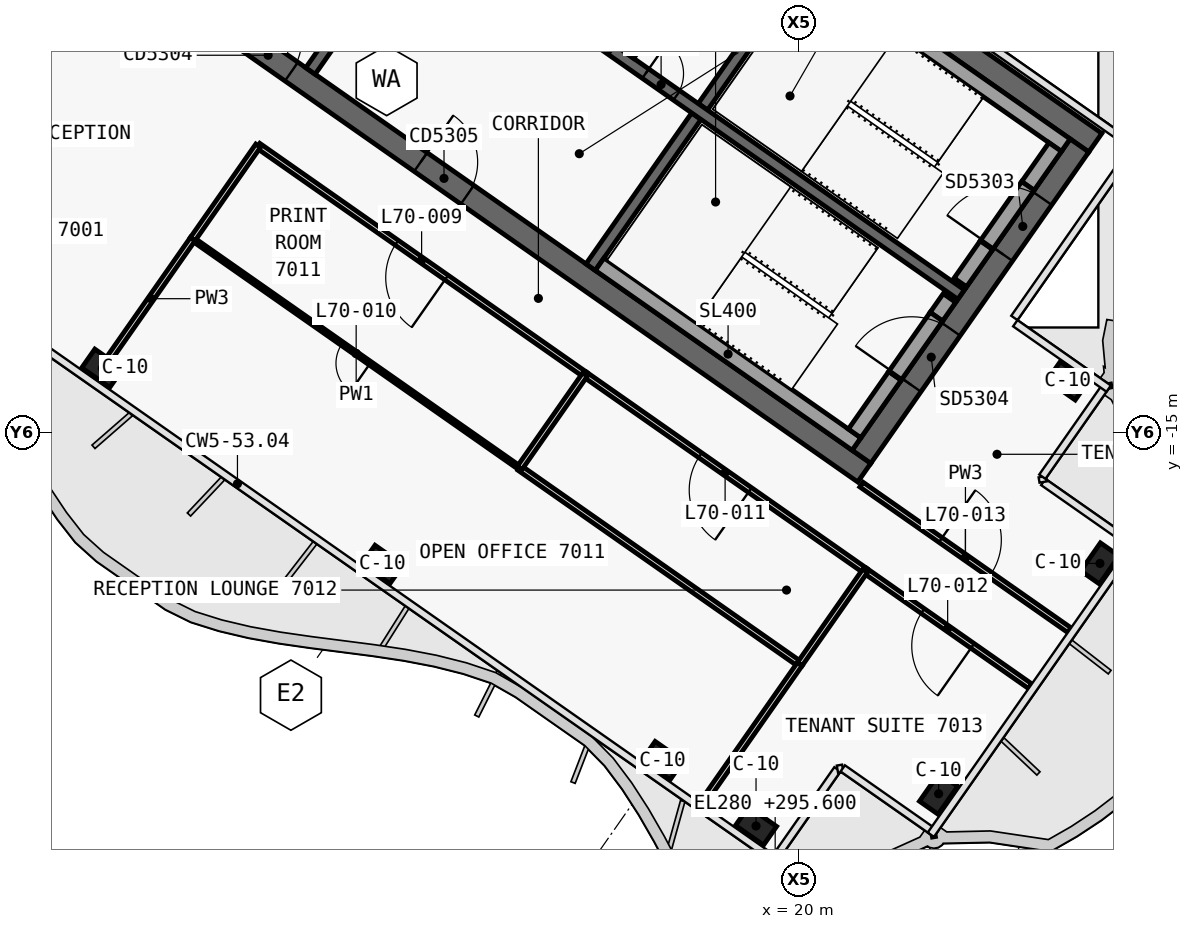
"""IFC4 building model, lengths in metres.
Left out: names, types, materials, properties, quantities, classifications, styles, units other than length and angle.
Written with IfcOpenShell. Run it as: python <this file> out.ifc"""

import sys

from ifc_helpers import new_model, si_unit, direction, frame, frame_2d, origin, origin_2d, place, context, subcontext, project, spatial, polyline, rectangle, outline, extrude, element, fill, save


model = new_model("IFC4")
c1 = context("Model", 3, precision=1e-05, world=origin(), true_north=direction((0.0, 1.0)))
c2 = subcontext(c1, "Body", "Model", "MODEL_VIEW")
j1 = project(units=[si_unit("LENGTHUNIT", "METRE"), si_unit("PLANEANGLEUNIT", "RADIAN")], contexts=[c1])
p1 = place(None, origin())
s1 = spatial("IfcSite", under=j1, at=p1, CompositionType="ELEMENT")
p2 = place(p1, origin())
s2 = spatial("IfcBuilding", under=s1, at=p2, CompositionType="ELEMENT")
p3 = place(p2, frame((0.0, 0.0, 295.6)))
s3 = spatial("IfcBuildingStorey", under=s2, at=p3, CompositionType="ELEMENT", Elevation=295.6)
p4 = place(p3, frame((0.028, 12.066, 0.0), z_axis=(0.0, 0.0, 1.0), x_axis=(0.819151382952, -0.573577380837, 0.0)))
e1 = element("IfcWall", 1, at=p4, inside=s3, PredefinedType="SHEAR", context=c2, shape_type="SweptSolid", body=[
    extrude(outline(polyline([(33.898, 0.3), (0.0, 0.3), (0.42, -0.3), (33.898, -0.3), (33.898, 0.3)])), origin(), (0.0, 0.0, 1.0), 3.9),
])
p5 = place(p3, frame((0.028, -0.874, 0.0), z_axis=(0.0, 0.0, 1.0), x_axis=(0.819150035022, -0.573579305871, 0.0)))
e2 = element("IfcWall", 2, at=p5, inside=s3, PredefinedType="SHEAR", context=c2, shape_type="SweptSolid", body=[
    extrude(outline(polyline([(26.476, 0.3), (0.0, 0.3), (0.42, -0.3), (26.476, -0.3), (26.476, 0.3)])), origin(), (0.0, 0.0, 1.0), 3.9),
])
p6 = place(p5, frame((6.576, 0.0, 0.0)))
e3 = element("IfcOpeningElement", 3, at=p6, cuts=e2, PredefinedType="OPENING", context=c2, shape_type="SweptSolid", body=[
    extrude(rectangle(XDim=1.5, YDim=2.1, at=frame_2d((0.75, 1.05))), frame((0.0, 0.31, 0.0), z_axis=(0.0, -1.0, 0.0), x_axis=(1.0, 0.0, 0.0)), (0.0, 0.0, 1.0), 0.62),
])
p7 = place(p5, frame((12.226, 0.0, 0.0)))
e4 = element("IfcOpeningElement", 4, at=p7, cuts=e2, PredefinedType="OPENING", context=c2, shape_type="SweptSolid", body=[
    extrude(rectangle(XDim=1.5, YDim=2.1, at=frame_2d((0.75, 1.05))), frame((0.0, 0.31, 0.0), z_axis=(0.0, -1.0, 0.0), x_axis=(1.0, 0.0, 0.0)), (0.0, 0.0, 1.0), 0.62),
])
p8 = place(p3, frame((21.642, -15.642, 0.0), z_axis=(0.0, 0.0, 1.0), x_axis=(0.573586866468, 0.819144740944, 0.0)))
e5 = element("IfcWall", 5, at=p8, inside=s3, PredefinedType="SHEAR", context=c2, shape_type="SweptSolid", body=[
    extrude(outline(polyline([(10.0, 0.3), (0.0, 0.3), (0.0, -0.3), (10.0, -0.3), (10.0, 0.3)])), origin(), (0.0, 0.0, 1.0), 3.9),
])
p9 = place(p8, frame((6.5, 0.0, 0.0)))
e6 = element("IfcOpeningElement", 6, at=p9, cuts=e5, PredefinedType="OPENING", context=c2, shape_type="SweptSolid", body=[
    extrude(rectangle(XDim=1.8, YDim=2.1, at=frame_2d((0.9, 1.05))), frame((0.0, 0.31, 0.0), z_axis=(0.0, -1.0, 0.0), x_axis=(1.0, 0.0, 0.0)), (0.0, 0.0, 1.0), 0.62),
])
p10 = place(p8, frame((2.3, 0.0, 0.0)))
e7 = element("IfcOpeningElement", 7, at=p10, cuts=e5, PredefinedType="OPENING", context=c2, shape_type="SweptSolid", body=[
    extrude(rectangle(XDim=1.8, YDim=2.1, at=frame_2d((0.9, 1.05))), frame((0.0, 0.31, 0.0), z_axis=(0.0, -1.0, 0.0), x_axis=(1.0, 0.0, 0.0)), (0.0, 0.0, 1.0), 0.62),
])
p11 = place(p3, frame((7.143, -5.49, 0.0), z_axis=(0.0, 0.0, 1.0), x_axis=(0.573617744349, 0.819123118565, 0.0)))
e8 = element("IfcWall", 8, at=p11, inside=s3, PredefinedType="SHEAR", context=c2, shape_type="SweptSolid", body=[
    extrude(outline(polyline([(0.0, 0.15), (0.0, -0.15), (4.85, -0.15), (4.85, 0.15), (0.0, 0.15)])), origin(), (0.0, 0.0, 1.0), 3.9),
])
p12 = place(p3, frame((14.515, -10.652, 0.0), z_axis=(0.0, 0.0, 1.0), x_axis=(0.573560315113, 0.819163332265, 0.0)))
e9 = element("IfcWall", 9, at=p12, inside=s3, PredefinedType="SHEAR", context=c2, shape_type="SweptSolid", body=[
    extrude(outline(polyline([(0.0, 0.15), (0.0, -0.15), (4.85, -0.15), (4.85, 0.15), (0.0, 0.15)])), origin(), (0.0, 0.0, 1.0), 3.9),
])
p13 = place(p3, frame((17.469, -6.433, 0.0), z_axis=(0.0, 0.0, 1.0), x_axis=(0.573594092424, 0.81913968109, 0.0)))
e10 = element("IfcWall", 10, at=p13, inside=s3, PredefinedType="SHEAR", context=c2, shape_type="SweptSolid", body=[
    extrude(outline(polyline([(4.85, -0.15), (4.85, 0.15), (0.0, 0.15), (0.0, -0.15), (4.85, -0.15)])), origin(), (0.0, 0.0, 1.0), 3.9),
])
p14 = place(p3, frame((2.638, 3.768, 0.0), z_axis=(0.0, 0.0, 1.0), x_axis=(0.819155014212, -0.573572194837, 0.0)))
e11 = element("IfcWall", 11, at=p14, inside=s3, PredefinedType="SHEAR", context=c2, shape_type="SweptSolid", body=[
    extrude(outline(polyline([(0.0, 0.15), (0.0, -0.15), (26.4, -0.15), (26.4, 0.15), (0.0, 0.15)])), origin(), (0.0, 0.0, 1.0), 3.9),
])
p15 = place(p14, frame((9.637, 0.0, 0.0)))
e12 = element("IfcOpeningElement", 12, at=p15, cuts=e11, PredefinedType="OPENING", context=c2, shape_type="SweptSolid", body=[
    extrude(rectangle(XDim=1.2, YDim=2.1, at=frame_2d((0.6, 1.05))), frame((0.0, 0.16, 0.0), z_axis=(0.0, -1.0, 0.0), x_axis=(1.0, 0.0, 0.0)), (0.0, 0.0, 1.0), 0.32),
])
p16 = place(p14, frame((11.812, 0.0, 0.0)))
e13 = element("IfcOpeningElement", 13, at=p16, cuts=e11, PredefinedType="OPENING", context=c2, shape_type="SweptSolid", body=[
    extrude(rectangle(XDim=1.2, YDim=2.1, at=frame_2d((0.6, 1.05))), frame((0.0, 0.16, 0.0), z_axis=(0.0, -1.0, 0.0), x_axis=(1.0, 0.0, 0.0)), (0.0, 0.0, 1.0), 0.32),
])
p17 = place(p14, frame((13.988, 0.0, 0.0)))
e14 = element("IfcOpeningElement", 14, at=p17, cuts=e11, PredefinedType="OPENING", context=c2, shape_type="SweptSolid", body=[
    extrude(rectangle(XDim=1.2, YDim=2.1, at=frame_2d((0.6, 1.05))), frame((0.0, 0.16, 0.0), z_axis=(0.0, -1.0, 0.0), x_axis=(1.0, 0.0, 0.0)), (0.0, 0.0, 1.0), 0.32),
])
p18 = place(p14, frame((16.262, 0.0, 0.0)))
e15 = element("IfcOpeningElement", 15, at=p18, cuts=e11, PredefinedType="OPENING", context=c2, shape_type="SweptSolid", body=[
    extrude(rectangle(XDim=1.0, YDim=2.1, at=frame_2d((0.5, 1.05))), frame((0.0, 0.16, 0.0), z_axis=(0.0, -1.0, 0.0), x_axis=(1.0, 0.0, 0.0)), (0.0, 0.0, 1.0), 0.32),
])
for number, where, z_axis, x_axis in (
    (16, (1.665, -13.313, 0.0), (0.0, 0.0, 1.0), (0.819, -0.574, 0.0)),
    (17, (9.038, -18.475, 0.0), (0.0, 0.0, 1.0), (0.819, -0.574, 0.0)),
    (18, (16.41, -23.637, 0.0), (0.0, 0.0, 1.0), (0.819, -0.574, 0.0)),
    (19, (18.867, -25.358, 0.0), (0.0, 0.0, 1.0), (0.819, -0.574, 0.0)),
    (20, (27.07, -13.644, 0.0), (0.0, 0.0, 1.0), (0.819, -0.574, 0.0)),
    (21, (23.672, -24.51, 0.0), (0.0, 0.0, 1.0), (0.574, 0.819, 0.0)),
    (22, (27.917, -18.449, 0.0), (0.0, 0.0, 1.0), (0.574, 0.819, 0.0)),
):
    element("IfcColumn", number, at=place(p3, frame(where, z_axis=z_axis, x_axis=x_axis)), inside=s3, PredefinedType="COLUMN", context=c2, shape_type="SweptSolid", body=[
        extrude(rectangle(XDim=0.9, YDim=0.6, at=origin_2d()), origin(), (0.0, 0.0, 1.0), 3.9),
    ])
p19 = place(p3, frame((15.565, -5.1, 0.0), z_axis=(0.0, 0.0, 1.0), x_axis=(0.573560315113, 0.819163332265, 0.0)))
e23 = element("IfcWall", 23, at=p19, inside=s3, PredefinedType="SOLIDWALL", context=c2, shape_type="SweptSolid", body=[
    extrude(rectangle(XDim=4.85, YDim=0.2, at=frame_2d((2.425, 0.0))), origin(), (0.0, 0.0, 1.0), 3.9),
])
p20 = place(p3, frame((20.259, -2.71, 0.0), z_axis=(0.0, 0.0, 1.0), x_axis=(0.81914849389, -0.573581506813, 0.0)))
e24 = element("IfcWall", 24, at=p20, inside=s3, PredefinedType="SOLIDWALL", context=c2, shape_type="SweptSolid", body=[
    extrude(rectangle(XDim=8.25, YDim=0.4, at=frame_2d((4.125, 0.0))), origin(), (0.0, 0.0, 1.0), 3.62),
])
p21 = place(p3, frame((24.244, -11.055, 0.0), z_axis=(0.0, 0.0, 1.0), x_axis=(0.573571582932, 0.819155442668, 0.0)))
e25 = element("IfcWall", 25, at=p21, inside=s3, PredefinedType="SOLIDWALL", context=c2, shape_type="SweptSolid", body=[
    extrude(rectangle(XDim=1.2, YDim=0.4, at=frame_2d((0.6, 0.0))), origin(), (0.0, 0.0, 1.0), 3.62),
])
p22 = place(p3, frame((26.022, -8.515, 0.0), z_axis=(0.0, 0.0, 1.0), x_axis=(0.573619628835, 0.819121798889, 0.0)))
e26 = element("IfcWall", 26, at=p22, inside=s3, PredefinedType="SOLIDWALL", context=c2, shape_type="SweptSolid", body=[
    extrude(rectangle(XDim=1.25, YDim=0.4, at=frame_2d((0.625, 0.0))), origin(), (0.0, 0.0, 1.0), 3.62),
])
p23 = place(p3, frame((24.932, -10.072, 2.15), z_axis=(0.0, 0.0, 1.0), x_axis=(0.573591692345, 0.819141361715, 0.0)))
e27 = element("IfcWall", 27, at=p23, inside=s3, PredefinedType="SOLIDWALL", context=c2, shape_type="SweptSolid", body=[
    extrude(rectangle(XDim=1.9, YDim=0.4, at=frame_2d((0.95, 0.0))), origin(), (0.0, 0.0, 1.0), 1.47),
])
p24 = place(p3, frame((14.753, -10.574, 0.0), z_axis=(0.0, 0.0, 1.0), x_axis=(0.819158229677, -0.573567602601, 0.0)))
e28 = element("IfcWall", 28, at=p24, inside=s3, PredefinedType="SOLIDWALL", context=c2, shape_type="SweptSolid", body=[
    extrude(rectangle(XDim=8.25, YDim=0.4, at=frame_2d((4.125, 0.0))), origin(), (0.0, 0.0, 1.0), 3.62),
])
p25 = place(p3, frame((21.462, -15.028, 0.0), z_axis=(0.0, 0.0, 1.0), x_axis=(0.573559770908, 0.819163713305, 0.0)))
e29 = element("IfcWall", 29, at=p25, inside=s3, PredefinedType="SOLIDWALL", context=c2, shape_type="SweptSolid", body=[
    extrude(rectangle(XDim=1.85, YDim=0.4, at=frame_2d((0.925, 0.0))), origin(), (0.0, 0.0, 1.0), 3.62),
])
p26 = place(p3, frame((23.613, -11.956, 0.0), z_axis=(0.0, 0.0, 1.0), x_axis=(0.573435029941, 0.819251039936, 0.0)))
e30 = element("IfcWall", 30, at=p26, inside=s3, PredefinedType="SOLIDWALL", context=c2, shape_type="SweptSolid", body=[
    extrude(rectangle(XDim=0.6, YDim=0.4, at=frame_2d((0.3, 0.0))), origin(), (0.0, 0.0, 1.0), 3.62),
])
p27 = place(p3, frame((22.523, -13.512, 2.15), z_axis=(0.0, 0.0, 1.0), x_axis=(0.573591692345, 0.819141361715, 0.0)))
e31 = element("IfcWall", 31, at=p27, inside=s3, PredefinedType="SOLIDWALL", context=c2, shape_type="SweptSolid", body=[
    extrude(rectangle(XDim=1.9, YDim=0.4, at=frame_2d((0.95, 0.0))), origin(), (0.0, 0.0, 1.0), 1.47),
])
p28 = place(p3, frame((21.642, -16.375, 0.0), z_axis=(0.0, 0.0, 1.0), x_axis=(0.819147777977, -0.573582529227, 0.0)))
e32 = element("IfcWall", 32, at=p28, inside=s3, PredefinedType="PARTITIONING", context=c2, shape_type="SweptSolid", body=[
    extrude(rectangle(XDim=6.68, YDim=0.15, at=frame_2d((3.34, 0.0))), origin(), (0.0, 0.0, 1.0), 3.0),
])
p29 = place(p28, frame((2.54, 0.0, 0.0)))
e33 = element("IfcOpeningElement", 33, at=p29, cuts=e32, PredefinedType="OPENING", context=c2, shape_type="SweptSolid", body=[
    extrude(rectangle(XDim=1.6, YDim=2.1, at=frame_2d((0.8, 1.05))), frame((0.0, 0.085, 0.0), z_axis=(0.0, -1.0, 0.0), x_axis=(1.0, 0.0, 0.0)), (0.0, 0.0, 1.0), 0.17),
])
p30 = place(p3, frame((14.369, -13.479, 0.0), z_axis=(0.0, 0.0, 1.0), x_axis=(-0.819154371039, 0.573573113393, 0.0)))
e34 = element("IfcWall", 34, at=p30, inside=s3, PredefinedType="PARTITIONING", context=c2, shape_type="SweptSolid", body=[
    extrude(rectangle(XDim=10.502, YDim=0.15, at=frame_2d((5.251, 0.0))), origin(), (0.0, 0.0, 1.0), 3.05),
])
p31 = place(p30, frame((4.451, 0.0, 0.0)))
e35 = element("IfcOpeningElement", 35, at=p31, cuts=e34, PredefinedType="OPENING", context=c2, shape_type="SweptSolid", body=[
    extrude(rectangle(XDim=1.6, YDim=2.1, at=frame_2d((0.8, 1.05))), frame((0.0, 0.085, 0.0), z_axis=(0.0, -1.0, 0.0), x_axis=(1.0, 0.0, 0.0)), (0.0, 0.0, 1.0), 0.17),
])
p32 = place(p3, frame((21.741, -18.642, 0.0), z_axis=(0.0, 0.0, 1.0), x_axis=(-0.819164400877, 0.57355878891, 0.0)))
e36 = element("IfcWall", 36, at=p32, inside=s3, PredefinedType="PARTITIONING", context=c2, shape_type="SweptSolid", body=[
    extrude(rectangle(XDim=9.004, YDim=0.15, at=frame_2d((4.502, 0.0))), origin(), (0.0, 0.0, 1.0), 3.05),
])
p33 = place(p32, frame((3.702, 0.0, 0.0)))
e37 = element("IfcOpeningElement", 37, at=p33, cuts=e36, PredefinedType="OPENING", context=c2, shape_type="SweptSolid", body=[
    extrude(rectangle(XDim=1.6, YDim=2.1, at=frame_2d((0.8, 1.05))), frame((0.0, 0.085, 0.0), z_axis=(0.0, -1.0, 0.0), x_axis=(1.0, 0.0, 0.0)), (0.0, 0.0, 1.0), 0.17),
])
p34 = place(p3, frame((26.081, -21.68, 0.0), z_axis=(0.0, 0.0, 1.0), x_axis=(-0.81915186898, 0.573576686718, 0.0)))
e38 = element("IfcWall", 38, at=p34, inside=s3, PredefinedType="PARTITIONING", context=c2, shape_type="SweptSolid", body=[
    extrude(rectangle(XDim=5.302, YDim=0.15, at=frame_2d((2.651, 0.0))), origin(), (0.0, 0.0, 1.0), 3.0),
])
p35 = place(p34, frame((1.851, 0.0, 0.0)))
e39 = element("IfcOpeningElement", 39, at=p35, cuts=e38, PredefinedType="OPENING", context=c2, shape_type="SweptSolid", body=[
    extrude(rectangle(XDim=1.6, YDim=2.1, at=frame_2d((0.8, 1.05))), frame((0.0, 0.085, 0.0), z_axis=(0.0, -1.0, 0.0), x_axis=(1.0, 0.0, 0.0)), (0.0, 0.0, 1.0), 0.17),
])
p36 = place(p3, frame((12.646, -15.937, 0.0), z_axis=(0.0, 0.0, 1.0), x_axis=(-0.81914779845, 0.57358249999, 0.0)))
e40 = element("IfcWall", 40, at=p36, inside=s3, PredefinedType="PARTITIONING", context=c2, shape_type="SweptSolid", body=[
    extrude(rectangle(XDim=10.5, YDim=0.1, at=frame_2d((5.25, 0.0))), origin(), (0.0, 0.0, 1.0), 3.05),
])
p37 = place(p36, frame((4.8, 0.0, 0.0)))
e41 = element("IfcOpeningElement", 41, at=p37, cuts=e40, PredefinedType="OPENING", context=c2, shape_type="SweptSolid", body=[
    extrude(rectangle(XDim=0.9, YDim=2.1, at=frame_2d((0.45, 1.05))), frame((0.0, 0.06, 0.0), z_axis=(0.0, -1.0, 0.0), x_axis=(1.0, 0.0, 0.0)), (0.0, 0.0, 1.0), 0.12),
])
p38 = place(p3, frame((12.646, -15.937, 0.0), z_axis=(0.0, 0.0, 1.0), x_axis=(0.819150352239, -0.573578852841, 0.0)))
e42 = element("IfcWall", 42, at=p38, inside=s3, PredefinedType="PARTITIONING", context=c2, shape_type="SweptSolid", body=[
    extrude(rectangle(XDim=9.0, YDim=0.15, at=frame_2d((4.5, 0.0))), origin(), (0.0, 0.0, 1.0), 3.05),
])
p39 = place(p3, frame((20.019, -21.099, 0.0), z_axis=(0.0, 0.0, 1.0), x_axis=(-0.573589807488, -0.819142681555, 0.0)))
e43 = element("IfcWall", 43, at=p39, inside=s3, PredefinedType="PARTITIONING", context=c2, shape_type="SweptSolid", body=[
    extrude(rectangle(XDim=4.499, YDim=0.15, at=frame_2d((2.25, 0.0))), origin(), (0.0, 0.0, 1.0), 3.0),
])
p40 = place(p3, frame((1.849, -13.051, 0.0), z_axis=(0.0, 0.0, 1.0), x_axis=(0.573594994199, 0.819139049631, 0.0)))
e44 = element("IfcWall", 44, at=p40, inside=s3, PredefinedType="PARTITIONING", context=c2, shape_type="SweptSolid", body=[
    extrude(rectangle(XDim=3.829, YDim=0.15, at=frame_2d((1.915, 0.0))), origin(), (0.0, 0.0, 1.0), 3.05),
])
p41 = place(p3, frame((14.367, -13.479, 0.0), z_axis=(0.0, 0.0, 1.0), x_axis=(-0.573598887793, -0.819136323161, 0.0)))
e45 = element("IfcWall", 45, at=p41, inside=s3, PredefinedType="PARTITIONING", context=c2, shape_type="SweptSolid", body=[
    extrude(rectangle(XDim=3.0, YDim=0.15, at=frame_2d((1.5, 0.0))), origin(), (0.0, 0.0, 1.0), 3.62),
])
p42 = place(p3, frame((4.046, -9.913, 0.0), z_axis=(0.0, 0.0, 1.0), x_axis=(0.573560650686, 0.819163097304, 0.0)))
e46 = element("IfcWall", 46, at=p42, inside=s3, PredefinedType="PARTITIONING", context=c2, shape_type="SweptSolid", body=[
    extrude(rectangle(XDim=3.0, YDim=0.15, at=frame_2d((1.5, 0.0))), origin(), (0.0, 0.0, 1.0), 3.05),
])
p43 = place(p3, frame((21.74, -18.641, 0.0), z_axis=(0.0, 0.0, 1.0), x_axis=(-0.573598887793, -0.819136323161, 0.0)))
e47 = element("IfcWall", 47, at=p43, inside=s3, PredefinedType="PARTITIONING", context=c2, shape_type="SweptSolid", body=[
    extrude(rectangle(XDim=3.0, YDim=0.15, at=frame_2d((1.5, 0.0))), origin(), (0.0, 0.0, 1.0), 3.05),
])
p44 = place(p18, origin())
e48 = element("IfcDoor", 48, at=p44, inside=s3, OperationType="SINGLE_SWING_RIGHT", PredefinedType="DOOR", context=c2, shape_type="SweptSolid", body=[
    extrude(rectangle(XDim=1.0, YDim=2.1, at=frame_2d((0.5, 1.05))), frame((0.0, 0.025, 0.0), z_axis=(0.0, -1.0, 0.0), x_axis=(1.0, 0.0, 0.0)), (0.0, 0.0, 1.0), 0.05),
])
fill(e15, e48)
p45 = place(p6, origin())
e49 = element("IfcDoor", 49, at=p45, inside=s3, OperationType="SINGLE_SWING_RIGHT", PredefinedType="DOOR", context=c2, shape_type="SweptSolid", body=[
    extrude(rectangle(XDim=1.5, YDim=2.1, at=frame_2d((0.75, 1.05))), frame((0.0, 0.025, 0.0), z_axis=(0.0, -1.0, 0.0), x_axis=(1.0, 0.0, 0.0)), (0.0, 0.0, 1.0), 0.05),
])
fill(e3, e49)
p46 = place(p7, origin())
e50 = element("IfcDoor", 50, at=p46, inside=s3, OperationType="DOUBLE_DOOR_SINGLE_SWING", PredefinedType="DOOR", context=c2, shape_type="SweptSolid", body=[
    extrude(rectangle(XDim=1.5, YDim=2.1, at=frame_2d((0.75, 1.05))), frame((0.0, 0.025, 0.0), z_axis=(0.0, -1.0, 0.0), x_axis=(1.0, 0.0, 0.0)), (0.0, 0.0, 1.0), 0.05),
])
fill(e4, e50)
p47 = place(p9, origin())
e51 = element("IfcDoor", 51, at=p47, inside=s3, OperationType="DOUBLE_DOOR_SINGLE_SWING", PredefinedType="DOOR", context=c2, shape_type="SweptSolid", body=[
    extrude(rectangle(XDim=1.8, YDim=2.1, at=frame_2d((0.9, 1.05))), frame((0.0, 0.025, 0.0), z_axis=(0.0, -1.0, 0.0), x_axis=(1.0, 0.0, 0.0)), (0.0, 0.0, 1.0), 0.05),
])
fill(e6, e51)
p48 = place(p10, origin())
e52 = element("IfcDoor", 52, at=p48, inside=s3, OperationType="DOUBLE_DOOR_SINGLE_SWING", PredefinedType="DOOR", context=c2, shape_type="SweptSolid", body=[
    extrude(rectangle(XDim=1.8, YDim=2.1, at=frame_2d((0.9, 1.05))), frame((0.0, 0.025, 0.0), z_axis=(0.0, -1.0, 0.0), x_axis=(1.0, 0.0, 0.0)), (0.0, 0.0, 1.0), 0.05),
])
fill(e7, e52)
p49 = place(p31, origin())
e53 = element("IfcDoor", 53, at=p49, inside=s3, OperationType="DOUBLE_DOOR_SINGLE_SWING", PredefinedType="DOOR", context=c2, shape_type="SweptSolid", body=[
    extrude(rectangle(XDim=1.6, YDim=2.1, at=frame_2d((0.8, 1.05))), frame((0.0, 0.025, 0.0), z_axis=(0.0, -1.0, 0.0), x_axis=(1.0, 0.0, 0.0)), (0.0, 0.0, 1.0), 0.05),
])
fill(e35, e53)
p50 = place(p37, origin())
e54 = element("IfcDoor", 54, at=p50, inside=s3, OperationType="SINGLE_SWING_LEFT", PredefinedType="DOOR", context=c2, shape_type="SweptSolid", body=[
    extrude(rectangle(XDim=0.9, YDim=2.1, at=frame_2d((0.45, 1.05))), frame((0.0, 0.025, 0.0), z_axis=(0.0, -1.0, 0.0), x_axis=(1.0, 0.0, 0.0)), (0.0, 0.0, 1.0), 0.05),
])
fill(e41, e54)
p51 = place(p33, origin())
e55 = element("IfcDoor", 55, at=p51, inside=s3, OperationType="DOUBLE_DOOR_SINGLE_SWING", PredefinedType="DOOR", context=c2, shape_type="SweptSolid", body=[
    extrude(rectangle(XDim=1.6, YDim=2.1, at=frame_2d((0.8, 1.05))), frame((0.0, 0.025, 0.0), z_axis=(0.0, -1.0, 0.0), x_axis=(1.0, 0.0, 0.0)), (0.0, 0.0, 1.0), 0.05),
])
fill(e37, e55)
p52 = place(p35, origin())
e56 = element("IfcDoor", 56, at=p52, inside=s3, OperationType="DOUBLE_DOOR_SINGLE_SWING", PredefinedType="DOOR", context=c2, shape_type="SweptSolid", body=[
    extrude(rectangle(XDim=1.6, YDim=2.1, at=frame_2d((0.8, 1.05))), frame((0.0, 0.025, 0.0), z_axis=(0.0, -1.0, 0.0), x_axis=(1.0, 0.0, 0.0)), (0.0, 0.0, 1.0), 0.05),
])
fill(e39, e56)
p53 = place(p29, origin())
e57 = element("IfcDoor", 57, at=p53, inside=s3, OperationType="DOUBLE_DOOR_SINGLE_SWING", PredefinedType="DOOR", context=c2, shape_type="SweptSolid", body=[
    extrude(rectangle(XDim=1.6, YDim=2.1, at=frame_2d((0.8, 1.05))), frame((0.0, 0.025, 0.0), z_axis=(0.0, -1.0, 0.0), x_axis=(1.0, 0.0, 0.0)), (0.0, 0.0, 1.0), 0.05),
])
fill(e33, e57)
save(model, sys.argv[1])
